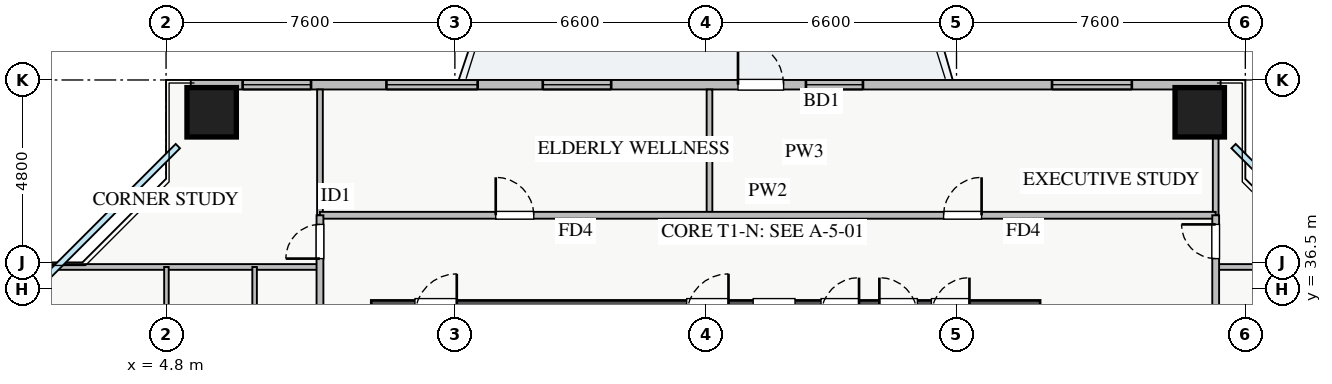
"""IFC4 building model, lengths in metres.
Left out: names, types, materials, properties, quantities, classifications, styles, units other than length and angle.
Written with IfcOpenShell. Run it as: python <this file> out.ifc"""

import sys

from ifc_helpers import new_model, si_unit, direction, frame, frame_2d, origin, origin_2d, place, context, subcontext, project, spatial, rectangle, extrude, source, transform, mapped, element, fill, save


model = new_model("IFC4")
c1 = context("Model", 3, precision=1e-05, world=origin(), true_north=direction((0.0, 1.0)))
c2 = subcontext(c1, "Body", "Model", "MODEL_VIEW")
j1 = project(units=[si_unit("LENGTHUNIT", "METRE"), si_unit("PLANEANGLEUNIT", "RADIAN")], contexts=[c1])
p1 = place(None, origin())
s1 = spatial("IfcSite", under=j1, at=p1, CompositionType="ELEMENT")
p2 = place(p1, origin())
s2 = spatial("IfcBuilding", under=s1, at=p2, CompositionType="ELEMENT")
p3 = place(p2, frame((0.0, 0.0, 79.5)))
s3 = spatial("IfcBuildingStorey", under=s2, at=p3, CompositionType="ELEMENT", Elevation=79.5)
p4 = place(p3, frame((10.2, 35.8, 0.0), z_axis=(0.0, 0.0, 1.0), x_axis=(1.0, 0.0, 0.0)))
e1 = element("IfcWall", 1, at=p4, inside=s3, PredefinedType="SHEAR", context=c2, shape_type="SweptSolid", body=[
    extrude(rectangle(XDim=17.6, YDim=0.8, at=frame_2d((8.8, 0.0))), origin(), (0.0, 0.0, 1.0), 3.25),
])
p5 = place(p4, frame((1.15, 0.0, 0.0)))
e2 = element("IfcOpeningElement", 2, at=p5, cuts=e1, PredefinedType="OPENING", context=c2, shape_type="SweptSolid", body=[
    extrude(rectangle(XDim=1.1, YDim=2.05, at=frame_2d((0.55, 1.025))), frame((0.0, 0.41, 0.0), z_axis=(0.0, -1.0, 0.0), x_axis=(1.0, 0.0, 0.0)), (0.0, 0.0, 1.0), 0.82),
])
p6 = place(p4, frame((8.3, 0.0, 0.0)))
e3 = element("IfcOpeningElement", 3, at=p6, cuts=e1, PredefinedType="OPENING", context=c2, shape_type="SweptSolid", body=[
    extrude(rectangle(XDim=1.1, YDim=2.05, at=frame_2d((0.55, 1.025))), frame((0.0, 0.41, 0.0), z_axis=(0.0, -1.0, 0.0), x_axis=(1.0, 0.0, 0.0)), (0.0, 0.0, 1.0), 0.82),
])
p7 = place(p4, frame((10.05, 0.0, 0.0)))
e4 = element("IfcOpeningElement", 4, at=p7, cuts=e1, PredefinedType="OPENING", context=c2, shape_type="SweptSolid", body=[
    extrude(rectangle(XDim=1.1, YDim=2.05, at=frame_2d((0.55, 1.025))), frame((0.0, 0.41, 0.0), z_axis=(0.0, -1.0, 0.0), x_axis=(1.0, 0.0, 0.0)), (0.0, 0.0, 1.0), 0.82),
])
p8 = place(p4, frame((14.74, 0.0, 0.0)))
e5 = element("IfcOpeningElement", 5, at=p8, cuts=e1, PredefinedType="OPENING", context=c2, shape_type="SweptSolid", body=[
    extrude(rectangle(XDim=1.0, YDim=2.05, at=frame_2d((0.5, 1.025))), frame((0.0, 0.41, 0.0), z_axis=(0.0, -1.0, 0.0), x_axis=(1.0, 0.0, 0.0)), (0.0, 0.0, 1.0), 0.82),
])
p9 = place(p4, frame((11.835, 0.0, 0.0)))
e6 = element("IfcOpeningElement", 6, at=p9, cuts=e1, PredefinedType="OPENING", context=c2, shape_type="SweptSolid", body=[
    extrude(rectangle(XDim=1.0, YDim=2.05, at=frame_2d((0.5, 1.025))), frame((0.0, 0.41, 0.0), z_axis=(0.0, -1.0, 0.0), x_axis=(1.0, 0.0, 0.0)), (0.0, 0.0, 1.0), 0.82),
])
p10 = place(p4, frame((13.37, 0.0, 0.0)))
e7 = element("IfcOpeningElement", 7, at=p10, cuts=e1, PredefinedType="OPENING", context=c2, shape_type="SweptSolid", body=[
    extrude(rectangle(XDim=1.0, YDim=2.05, at=frame_2d((0.5, 1.025))), frame((0.0, 0.41, 0.0), z_axis=(0.0, -1.0, 0.0), x_axis=(1.0, 0.0, 0.0)), (0.0, 0.0, 1.0), 0.82),
])
m1 = source(origin(), c2, "Body", "SweptSolid", [
    extrude(rectangle(XDim=1.3, YDim=1.3, at=origin_2d()), origin(), (0.0, 0.0, 1.0), 3.25),
])
for number, where, z_axis, x_axis in (
    (8, (32.0, 41.15, 0.0), (0.0, 0.0, 1.0), (1.0, 0.0, 0.0)),
    (9, (6.0, 41.15, 0.0), (0.0, 0.0, 1.0), (1.0, 0.0, 0.0)),
):
    element("IfcColumn", number, at=place(p3, frame(where, z_axis=z_axis, x_axis=x_axis)), inside=s3, PredefinedType="COLUMN", context=c2, shape_type="MappedRepresentation", body=[
        mapped(m1, transform((0.0, 0.0, 0.0), x_axis=(1.0, 0.0, 0.0), y_axis=(0.0, 1.0, 0.0), z_axis=(0.0, 0.0, 1.0), scale=1.0)),
    ])
p11 = place(p3, frame((5.45, 41.875, 0.0), z_axis=(0.0, 0.0, 1.0), x_axis=(1.0, 0.0, 0.0)))
e10 = element("IfcWall", 10, at=p11, inside=s3, PredefinedType="STANDARD", context=c2, shape_type="SweptSolid", body=[
    extrude(rectangle(XDim=27.1, YDim=0.25, at=frame_2d((13.55, 0.0))), origin(), (0.0, 0.0, 1.0), 2.61),
])
p12 = place(p11, frame((14.4, 0.0, 0.0)))
e11 = element("IfcOpeningElement", 11, at=p12, cuts=e10, PredefinedType="OPENING", context=c2, shape_type="SweptSolid", body=[
    extrude(rectangle(XDim=1.2, YDim=2.1, at=frame_2d((0.6, 1.05))), frame((0.0, 0.135, 0.0), z_axis=(0.0, -1.0, 0.0), x_axis=(1.0, 0.0, 0.0)), (0.0, 0.0, 1.0), 0.27),
])
p13 = place(p11, frame((1.365, 0.0, 0.9)))
e12 = element("IfcOpeningElement", 12, at=p13, cuts=e10, PredefinedType="OPENING", context=c2, shape_type="SweptSolid", body=[
    extrude(rectangle(XDim=1.8, YDim=1.5, at=frame_2d((0.9, 0.75))), frame((0.0, 0.135, 0.0), z_axis=(0.0, -1.0, 0.0), x_axis=(1.0, 0.0, 0.0)), (0.0, 0.0, 1.0), 0.27),
])
p14 = place(p11, frame((9.263, 0.0, 0.9)))
e13 = element("IfcOpeningElement", 13, at=p14, cuts=e10, PredefinedType="OPENING", context=c2, shape_type="SweptSolid", body=[
    extrude(rectangle(XDim=1.8, YDim=1.45, at=frame_2d((0.9, 0.725))), frame((0.0, 0.135, 0.0), z_axis=(0.0, -1.0, 0.0), x_axis=(1.0, 0.0, 0.0)), (0.0, 0.0, 1.0), 0.27),
])
p15 = place(p11, frame((16.188, 0.0, 0.9)))
e14 = element("IfcOpeningElement", 14, at=p15, cuts=e10, PredefinedType="OPENING", context=c2, shape_type="SweptSolid", body=[
    extrude(rectangle(XDim=1.5, YDim=1.45, at=frame_2d((0.75, 0.725))), frame((0.0, 0.135, 0.0), z_axis=(0.0, -1.0, 0.0), x_axis=(1.0, 0.0, 0.0)), (0.0, 0.0, 1.0), 0.27),
])
p16 = place(p11, frame((22.663, 0.0, 0.9)))
e15 = element("IfcOpeningElement", 15, at=p16, cuts=e10, PredefinedType="OPENING", context=c2, shape_type="SweptSolid", body=[
    extrude(rectangle(XDim=2.1, YDim=1.48, at=frame_2d((1.05, 0.74))), frame((0.0, 0.135, 0.0), z_axis=(0.0, -1.0, 0.0), x_axis=(1.0, 0.0, 0.0)), (0.0, 0.0, 1.0), 0.27),
])
p17 = place(p11, frame((5.149, 0.0, 0.9)))
e16 = element("IfcOpeningElement", 16, at=p17, cuts=e10, PredefinedType="OPENING", context=c2, shape_type="SweptSolid", body=[
    extrude(rectangle(XDim=2.4, YDim=1.5, at=frame_2d((1.2, 0.75))), frame((0.0, 0.135, 0.0), z_axis=(0.0, -1.0, 0.0), x_axis=(1.0, 0.0, 0.0)), (0.0, 0.0, 1.0), 0.27),
])
p18 = place(p3, frame((19.1, 38.44, 0.0), z_axis=(0.0, 0.0, 1.0), x_axis=(0.0, 1.0, 0.0)))
e17 = element("IfcWall", 17, at=p18, inside=s3, PredefinedType="PARTITIONING", context=c2, shape_type="SweptSolid", body=[
    extrude(rectangle(XDim=3.31, YDim=0.15, at=frame_2d((1.655, 0.0))), origin(), (0.0, 0.0, 1.0), 2.821),
])
for number, where, z_axis, x_axis in (
    (18, (8.85, 38.44, 0.0), (0.0, 0.0, 1.0), (0.0, 1.0, 0.0)),
    (19, (32.42, 38.44, 0.0), (0.0, 0.0, 1.0), (0.0, 1.0, 0.0)),
):
    element("IfcWall", number, at=place(p3, frame(where, z_axis=z_axis, x_axis=x_axis)), inside=s3, PredefinedType="PARTITIONING", context=c2, shape_type="SweptSolid", body=[
        extrude(rectangle(XDim=3.31, YDim=0.15, at=frame_2d((1.655, 0.0))), origin(), (0.0, 0.0, 1.0), 3.07),
    ])
p19 = place(p3, frame((8.85, 38.44, 0.0), z_axis=(0.0, 0.0, 1.0), x_axis=(1.0, 0.0, 0.0)))
e20 = element("IfcWall", 20, at=p19, inside=s3, PredefinedType="PARTITIONING", context=c2, shape_type="SweptSolid", body=[
    extrude(rectangle(XDim=23.57, YDim=0.18, at=frame_2d((11.785, 0.0))), origin(), (0.0, 0.0, 1.0), 3.07),
])
p20 = place(p19, frame((4.625, 0.0, 0.0)))
e21 = element("IfcOpeningElement", 21, at=p20, cuts=e20, PredefinedType="OPENING", context=c2, shape_type="SweptSolid", body=[
    extrude(rectangle(XDim=1.0, YDim=2.05, at=frame_2d((0.5, 1.025))), frame((0.0, 0.1, 0.0), z_axis=(0.0, -1.0, 0.0), x_axis=(1.0, 0.0, 0.0)), (0.0, 0.0, 1.0), 0.2),
])
p21 = place(p19, frame((16.41, 0.0, 0.0)))
e22 = element("IfcOpeningElement", 22, at=p21, cuts=e20, PredefinedType="OPENING", context=c2, shape_type="SweptSolid", body=[
    extrude(rectangle(XDim=1.0, YDim=2.05, at=frame_2d((0.5, 1.025))), frame((0.0, 0.1, 0.0), z_axis=(0.0, -1.0, 0.0), x_axis=(1.0, 0.0, 0.0)), (0.0, 0.0, 1.0), 0.2),
])
p22 = place(p3, frame((0.25, 37.08, 0.0), z_axis=(0.0, 0.0, 1.0), x_axis=(1.0, 0.0, 0.0)))
e23 = element("IfcWall", 23, at=p22, inside=s3, PredefinedType="PARTITIONING", context=c2, shape_type="SweptSolid", body=[
    extrude(rectangle(XDim=8.6, YDim=0.15, at=frame_2d((4.3, 0.0))), origin(), (0.0, 0.0, 1.0), 3.07),
])
for number, where, z_axis, x_axis in (
    (24, (4.81, 32.14, 0.0), (0.0, 0.0, 1.0), (0.0, 1.0, 0.0)),
    (25, (7.13, 32.14, 0.0), (0.0, 0.0, 1.0), (0.0, 1.0, 0.0)),
):
    element("IfcWall", number, at=place(p3, frame(where, z_axis=z_axis, x_axis=x_axis)), inside=s3, PredefinedType="PLUMBINGWALL", context=c2, shape_type="SweptSolid", body=[
        extrude(rectangle(XDim=4.94, YDim=0.12, at=frame_2d((2.47, 0.0))), origin(), (0.0, 0.0, 1.0), 3.07),
    ])
p23 = place(p3, frame((8.85, 7.21, 0.0), z_axis=(0.0, 0.0, 1.0), x_axis=(0.0, 1.0, 0.0)))
e26 = element("IfcWall", 26, at=p23, inside=s3, PredefinedType="PARTITIONING", context=c2, shape_type="SweptSolid", body=[
    extrude(rectangle(XDim=31.23, YDim=0.18, at=frame_2d((15.615, 0.0))), origin(), (0.0, 0.0, 1.0), 3.07),
])
p24 = place(p23, frame((30.09, 0.0, 0.0)))
e27 = element("IfcOpeningElement", 27, at=p24, cuts=e26, PredefinedType="OPENING", context=c2, shape_type="SweptSolid", body=[
    extrude(rectangle(XDim=0.9, YDim=2.05, at=frame_2d((0.45, 1.025))), frame((0.0, 0.1, 0.0), z_axis=(0.0, -1.0, 0.0), x_axis=(1.0, 0.0, 0.0)), (0.0, 0.0, 1.0), 0.2),
])
p25 = place(p23, frame((0.24, 0.0, 0.0)))
e28 = element("IfcOpeningElement", 28, at=p25, cuts=e26, PredefinedType="OPENING", context=c2, shape_type="SweptSolid", body=[
    extrude(rectangle(XDim=0.9, YDim=2.05, at=frame_2d((0.45, 1.025))), frame((0.0, 0.1, 0.0), z_axis=(0.0, -1.0, 0.0), x_axis=(1.0, 0.0, 0.0)), (0.0, 0.0, 1.0), 0.2),
])
p26 = place(p23, frame((5.895, 0.0, 0.0)))
e29 = element("IfcOpeningElement", 29, at=p26, cuts=e26, PredefinedType="OPENING", context=c2, shape_type="SweptSolid", body=[
    extrude(rectangle(XDim=1.0, YDim=2.05, at=frame_2d((0.5, 1.025))), frame((0.0, 0.1, 0.0), z_axis=(0.0, -1.0, 0.0), x_axis=(1.0, 0.0, 0.0)), (0.0, 0.0, 1.0), 0.2),
])
p27 = place(p23, frame((12.885, 0.0, 0.0)))
e30 = element("IfcOpeningElement", 30, at=p27, cuts=e26, PredefinedType="OPENING", context=c2, shape_type="SweptSolid", body=[
    extrude(rectangle(XDim=1.0, YDim=2.05, at=frame_2d((0.5, 1.025))), frame((0.0, 0.1, 0.0), z_axis=(0.0, -1.0, 0.0), x_axis=(1.0, 0.0, 0.0)), (0.0, 0.0, 1.0), 0.2),
])
p28 = place(p23, frame((21.96, 0.0, 0.0)))
e31 = element("IfcOpeningElement", 31, at=p28, cuts=e26, PredefinedType="OPENING", context=c2, shape_type="SweptSolid", body=[
    extrude(rectangle(XDim=1.0, YDim=2.05, at=frame_2d((0.5, 1.025))), frame((0.0, 0.1, 0.0), z_axis=(0.0, -1.0, 0.0), x_axis=(1.0, 0.0, 0.0)), (0.0, 0.0, 1.0), 0.2),
])
p29 = place(p3, frame((32.42, 37.08, 0.0), z_axis=(0.0, 0.0, 1.0), x_axis=(1.0, 0.0, 0.0)))
e32 = element("IfcWall", 32, at=p29, inside=s3, PredefinedType="PARTITIONING", context=c2, shape_type="SweptSolid", body=[
    extrude(rectangle(XDim=5.33, YDim=0.15, at=frame_2d((2.665, 0.0))), origin(), (0.0, 0.0, 1.0), 3.07),
])
p30 = place(p3, frame((32.42, 7.21, 0.0), z_axis=(0.0, 0.0, 1.0), x_axis=(0.0, 1.0, 0.0)))
e33 = element("IfcWall", 33, at=p30, inside=s3, PredefinedType="PARTITIONING", context=c2, shape_type="SweptSolid", body=[
    extrude(rectangle(XDim=31.23, YDim=0.18, at=frame_2d((15.615, 0.0))), origin(), (0.0, 0.0, 1.0), 2.821),
])
p31 = place(p30, frame((30.09, 0.0, 0.0)))
e34 = element("IfcOpeningElement", 34, at=p31, cuts=e33, PredefinedType="OPENING", context=c2, shape_type="SweptSolid", body=[
    extrude(rectangle(XDim=0.9, YDim=2.05, at=frame_2d((0.45, 1.025))), frame((0.0, 0.1, 0.0), z_axis=(0.0, -1.0, 0.0), x_axis=(1.0, 0.0, 0.0)), (0.0, 0.0, 1.0), 0.2),
])
p32 = place(p30, frame((0.415, 0.0, 0.0)))
e35 = element("IfcOpeningElement", 35, at=p32, cuts=e33, PredefinedType="OPENING", context=c2, shape_type="SweptSolid", body=[
    extrude(rectangle(XDim=0.9, YDim=2.05, at=frame_2d((0.45, 1.025))), frame((0.0, 0.1, 0.0), z_axis=(0.0, -1.0, 0.0), x_axis=(1.0, 0.0, 0.0)), (0.0, 0.0, 1.0), 0.2),
])
p33 = place(p30, frame((5.675, 0.0, 0.0)))
e36 = element("IfcOpeningElement", 36, at=p33, cuts=e33, PredefinedType="OPENING", context=c2, shape_type="SweptSolid", body=[
    extrude(rectangle(XDim=1.0, YDim=2.05, at=frame_2d((0.5, 1.025))), frame((0.0, 0.1, 0.0), z_axis=(0.0, -1.0, 0.0), x_axis=(1.0, 0.0, 0.0)), (0.0, 0.0, 1.0), 0.2),
])
p34 = place(p30, frame((12.575, 0.0, 0.0)))
e37 = element("IfcOpeningElement", 37, at=p34, cuts=e33, PredefinedType="OPENING", context=c2, shape_type="SweptSolid", body=[
    extrude(rectangle(XDim=1.0, YDim=2.05, at=frame_2d((0.5, 1.025))), frame((0.0, 0.1, 0.0), z_axis=(0.0, -1.0, 0.0), x_axis=(1.0, 0.0, 0.0)), (0.0, 0.0, 1.0), 0.2),
])
p35 = place(p30, frame((22.5, 0.0, 0.0)))
e38 = element("IfcOpeningElement", 38, at=p35, cuts=e33, PredefinedType="OPENING", context=c2, shape_type="SweptSolid", body=[
    extrude(rectangle(XDim=1.0, YDim=2.05, at=frame_2d((0.5, 1.025))), frame((0.0, 0.1, 0.0), z_axis=(0.0, -1.0, 0.0), x_axis=(1.0, 0.0, 0.0)), (0.0, 0.0, 1.0), 0.2),
])
m2 = source(origin(), c2, "Body", "SweptSolid", [
    extrude(rectangle(XDim=1.2, YDim=2.1, at=frame_2d((0.6, 1.05))), frame((0.0, 0.025, 0.0), z_axis=(0.0, -1.0, 0.0), x_axis=(1.0, 0.0, 0.0)), (0.0, 0.0, 1.0), 0.05),
])
p36 = place(p12, origin())
e39 = element("IfcDoor", 39, at=p36, inside=s3, OperationType="SINGLE_SWING_LEFT", PredefinedType="DOOR", context=c2, shape_type="MappedRepresentation", body=[
    mapped(m2, transform((0.0, 0.0, 0.0), x_axis=(1.0, 0.0, 0.0), y_axis=(0.0, 1.0, 0.0), z_axis=(0.0, 0.0, 1.0), scale=1.0)),
])
fill(e11, e39)
m3 = source(origin(), c2, "Body", "SweptSolid", [
    extrude(rectangle(XDim=1.8, YDim=1.5, at=frame_2d((0.9, 0.75))), frame((0.0, 0.03, 0.0), z_axis=(0.0, -1.0, 0.0), x_axis=(1.0, 0.0, 0.0)), (0.0, 0.0, 1.0), 0.06),
])
p37 = place(p13, origin())
e40 = element("IfcWindow", 40, at=p37, inside=s3, PartitioningType="TRIPLE_PANEL_VERTICAL", PredefinedType="WINDOW", context=c2, shape_type="MappedRepresentation", body=[
    mapped(m3, transform((0.0, 0.0, 0.0), x_axis=(1.0, 0.0, 0.0), y_axis=(0.0, 1.0, 0.0), z_axis=(0.0, 0.0, 1.0), scale=1.0)),
])
fill(e12, e40)
m4 = source(origin(), c2, "Body", "SweptSolid", [
    extrude(rectangle(XDim=1.8, YDim=1.45, at=frame_2d((0.9, 0.725))), frame((0.0, 0.03, 0.0), z_axis=(0.0, -1.0, 0.0), x_axis=(1.0, 0.0, 0.0)), (0.0, 0.0, 1.0), 0.06),
])
p38 = place(p14, origin())
e41 = element("IfcWindow", 41, at=p38, inside=s3, PartitioningType="DOUBLE_PANEL_VERTICAL", PredefinedType="WINDOW", context=c2, shape_type="MappedRepresentation", body=[
    mapped(m4, transform((0.0, 0.0, 0.0), x_axis=(1.0, 0.0, 0.0), y_axis=(0.0, 1.0, 0.0), z_axis=(0.0, 0.0, 1.0), scale=1.0)),
])
fill(e13, e41)
m5 = source(origin(), c2, "Body", "SweptSolid", [
    extrude(rectangle(XDim=1.5, YDim=1.45, at=frame_2d((0.75, 0.725))), frame((0.0, 0.03, 0.0), z_axis=(0.0, -1.0, 0.0), x_axis=(1.0, 0.0, 0.0)), (0.0, 0.0, 1.0), 0.06),
])
p39 = place(p15, origin())
e42 = element("IfcWindow", 42, at=p39, inside=s3, PartitioningType="DOUBLE_PANEL_VERTICAL", PredefinedType="WINDOW", context=c2, shape_type="MappedRepresentation", body=[
    mapped(m5, transform((0.0, 0.0, 0.0), x_axis=(1.0, 0.0, 0.0), y_axis=(0.0, 1.0, 0.0), z_axis=(0.0, 0.0, 1.0), scale=1.0)),
])
fill(e14, e42)
m6 = source(origin(), c2, "Body", "SweptSolid", [
    extrude(rectangle(XDim=2.1, YDim=1.48, at=frame_2d((1.05, 0.74))), frame((0.0, 0.03, 0.0), z_axis=(0.0, -1.0, 0.0), x_axis=(1.0, 0.0, 0.0)), (0.0, 0.0, 1.0), 0.06),
])
p40 = place(p16, origin())
e43 = element("IfcWindow", 43, at=p40, inside=s3, PartitioningType="TRIPLE_PANEL_VERTICAL", PredefinedType="WINDOW", context=c2, shape_type="MappedRepresentation", body=[
    mapped(m6, transform((0.0, 0.0, 0.0), x_axis=(1.0, 0.0, 0.0), y_axis=(0.0, 1.0, 0.0), z_axis=(0.0, 0.0, 1.0), scale=1.0)),
])
fill(e15, e43)
m7 = source(origin(), c2, "Body", "SweptSolid", [
    extrude(rectangle(XDim=1.0, YDim=2.05, at=frame_2d((0.5, 1.025))), frame((0.0, 0.025, 0.0), z_axis=(0.0, -1.0, 0.0), x_axis=(1.0, 0.0, 0.0)), (0.0, 0.0, 1.0), 0.05),
])
p41 = place(p20, origin())
e44 = element("IfcDoor", 44, at=p41, inside=s3, OperationType="SINGLE_SWING_LEFT", PredefinedType="DOOR", context=c2, shape_type="MappedRepresentation", body=[
    mapped(m7, transform((0.0, 0.0, 0.0), x_axis=(1.0, 0.0, 0.0), y_axis=(0.0, 1.0, 0.0), z_axis=(0.0, 0.0, 1.0), scale=1.0)),
])
fill(e21, e44)
p42 = place(p21, origin())
e45 = element("IfcDoor", 45, at=p42, inside=s3, OperationType="SINGLE_SWING_RIGHT", PredefinedType="DOOR", context=c2, shape_type="MappedRepresentation", body=[
    mapped(m7, transform((0.0, 0.0, 0.0), x_axis=(1.0, 0.0, 0.0), y_axis=(0.0, 1.0, 0.0), z_axis=(0.0, 0.0, 1.0), scale=1.0)),
])
fill(e22, e45)
m8 = source(origin(), c2, "Body", "SweptSolid", [
    extrude(rectangle(XDim=0.9, YDim=2.05, at=frame_2d((0.45, 1.025))), frame((0.0, 0.025, 0.0), z_axis=(0.0, -1.0, 0.0), x_axis=(1.0, 0.0, 0.0)), (0.0, 0.0, 1.0), 0.05),
])
p43 = place(p24, origin())
e46 = element("IfcDoor", 46, at=p43, inside=s3, OperationType="SINGLE_SWING_LEFT", PredefinedType="DOOR", context=c2, shape_type="MappedRepresentation", body=[
    mapped(m8, transform((0.0, 0.0, 0.0), x_axis=(1.0, 0.0, 0.0), y_axis=(0.0, 1.0, 0.0), z_axis=(0.0, 0.0, 1.0), scale=1.0)),
])
fill(e27, e46)
p44 = place(p31, origin())
e47 = element("IfcDoor", 47, at=p44, inside=s3, OperationType="SINGLE_SWING_RIGHT", PredefinedType="DOOR", context=c2, shape_type="MappedRepresentation", body=[
    mapped(m8, transform((0.0, 0.0, 0.0), x_axis=(1.0, 0.0, 0.0), y_axis=(0.0, 1.0, 0.0), z_axis=(0.0, 0.0, 1.0), scale=1.0)),
])
fill(e34, e47)
m9 = source(origin(), c2, "Body", "SweptSolid", [
    extrude(rectangle(XDim=2.4, YDim=1.5, at=frame_2d((1.2, 0.75))), frame((0.0, 0.03, 0.0), z_axis=(0.0, -1.0, 0.0), x_axis=(1.0, 0.0, 0.0)), (0.0, 0.0, 1.0), 0.06),
])
p45 = place(p17, origin())
e48 = element("IfcWindow", 48, at=p45, inside=s3, PartitioningType="TRIPLE_PANEL_VERTICAL", PredefinedType="WINDOW", context=c2, shape_type="MappedRepresentation", body=[
    mapped(m9, transform((0.0, 0.0, 0.0), x_axis=(1.0, 0.0, 0.0), y_axis=(0.0, 1.0, 0.0), z_axis=(0.0, 0.0, 1.0), scale=1.0)),
])
fill(e16, e48)
save(model, sys.argv[1])
